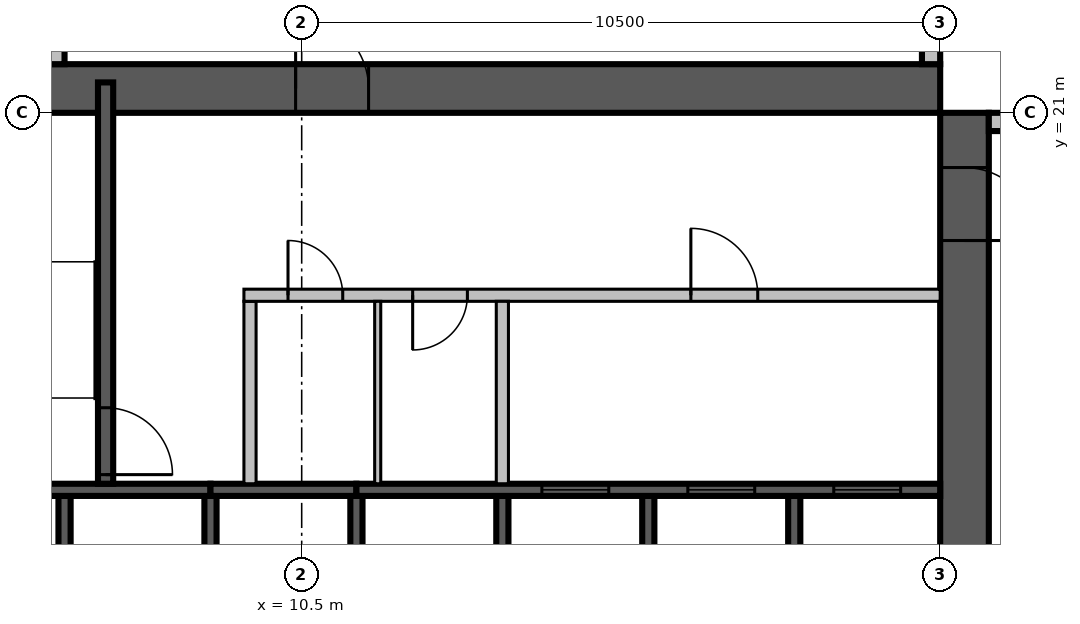
"""IFC4 building model, lengths in metres.
Left out: names, types, materials, properties, quantities, classifications, styles, units other than length and angle.
Written with IfcOpenShell. Run it as: python <this file> out.ifc"""

import sys

from ifc_helpers import new_model, si_unit, direction, frame, frame_2d, origin, place, context, subcontext, project, spatial, rectangle, extrude, source, transform, mapped, element, fill, save


model = new_model("IFC4")
c1 = context("Model", 3, precision=1e-05, world=origin(), true_north=direction((0.0, 1.0)))
c2 = subcontext(c1, "Body", "Model", "MODEL_VIEW")
j1 = project(units=[si_unit("LENGTHUNIT", "METRE"), si_unit("PLANEANGLEUNIT", "RADIAN")], contexts=[c1])
p1 = place(None, origin())
s1 = spatial("IfcSite", under=j1, at=p1, CompositionType="ELEMENT")
p2 = place(p1, origin())
s2 = spatial("IfcBuilding", under=s1, at=p2, CompositionType="ELEMENT")
p3 = place(p2, frame((0.0, 0.0, 204.4)))
s3 = spatial("IfcBuildingStorey", under=s2, at=p3, CompositionType="ELEMENT", Elevation=204.4)
m1 = source(origin(), c2, "Body", "SweptSolid", [
    extrude(rectangle(XDim=16.8, YDim=0.8, at=frame_2d((8.4, 0.0))), origin(), (0.0, 0.0, 1.0), 3.8),
])
p4 = place(p3, frame((21.4, 4.2, 0.0), z_axis=(0.0, 0.0, 1.0), x_axis=(0.0, 1.0, 0.0)))
e1 = element("IfcWall", 1, at=p4, inside=s3, PredefinedType="SHEAR", context=c2, shape_type="MappedRepresentation", body=[
    mapped(m1, transform((0.0, 0.0, 0.0), scale=1.0)),
])
m2 = source(origin(), c2, "Body", "SweptSolid", [
    extrude(rectangle(XDim=2.2, YDim=2.1, at=frame_2d((1.1, 1.05))), frame((0.0, 0.41, 0.0), z_axis=(0.0, -1.0, 0.0), x_axis=(1.0, 0.0, 0.0)), (0.0, 0.0, 1.0), 0.82),
])
p5 = place(p4, frame((4.2, 0.0, 0.0)))
e2 = element("IfcOpeningElement", 2, at=p5, cuts=e1, PredefinedType="OPENING", context=c2, shape_type="MappedRepresentation", body=[
    mapped(m2, transform((0.0, 0.0, 0.0), scale=1.0)),
])
m3 = source(origin(), c2, "Body", "SweptSolid", [
    extrude(rectangle(XDim=1.2, YDim=2.1, at=frame_2d((0.6, 1.05))), frame((0.0, 0.41, 0.0), z_axis=(0.0, -1.0, 0.0), x_axis=(1.0, 0.0, 0.0)), (0.0, 0.0, 1.0), 0.82),
])
p6 = place(p4, frame((14.7, 0.0, 0.0)))
e3 = element("IfcOpeningElement", 3, at=p6, cuts=e1, PredefinedType="OPENING", context=c2, shape_type="MappedRepresentation", body=[
    mapped(m3, transform((0.0, 0.0, 0.0), scale=1.0)),
])
p7 = place(p3, frame((4.2, 21.4, 0.0), z_axis=(0.0, 0.0, 1.0), x_axis=(1.0, 0.0, 0.0)))
e4 = element("IfcWall", 4, at=p7, inside=s3, PredefinedType="SHEAR", context=c2, shape_type="MappedRepresentation", body=[
    mapped(m1, transform((0.0, 0.0, 0.0), scale=1.0)),
])
p8 = place(p7, frame((6.2, 0.0, 0.0)))
e5 = element("IfcOpeningElement", 5, at=p8, cuts=e4, PredefinedType="OPENING", context=c2, shape_type="MappedRepresentation", body=[
    mapped(m3, transform((0.0, 0.0, 0.0), scale=1.0)),
])
m4 = source(origin(), c2, "Body", "SweptSolid", [
    extrude(rectangle(XDim=7.15, YDim=0.3, at=frame_2d((3.575, 0.0))), origin(), (0.0, 0.0, 1.0), 3.4),
])
p9 = place(p3, frame((28.95, 20.85, 0.0), z_axis=(0.0, 0.0, 1.0), x_axis=(-1.0, 0.0, 0.0)))
e6 = element("IfcWall", 6, at=p9, inside=s3, PredefinedType="STANDARD", context=c2, shape_type="MappedRepresentation", body=[
    mapped(m4, transform((0.0, 0.0, 0.0), scale=1.0)),
])
m5 = source(origin(), c2, "Body", "SweptSolid", [
    extrude(rectangle(XDim=3.0, YDim=2.3, at=frame_2d((1.5, 1.15))), frame((0.0, 0.16, 0.0), z_axis=(0.0, -1.0, 0.0), x_axis=(1.0, 0.0, 0.0)), (0.0, 0.0, 1.0), 0.32),
])
p10 = place(p9, frame((0.15, 0.0, 0.6)))
e7 = element("IfcOpeningElement", 7, at=p10, cuts=e6, PredefinedType="OPENING", context=c2, shape_type="MappedRepresentation", body=[
    mapped(m5, transform((0.0, 0.0, 0.0), scale=1.0)),
])
m6 = source(origin(), c2, "Body", "SweptSolid", [
    extrude(rectangle(XDim=1.8, YDim=2.3, at=frame_2d((0.9, 1.15))), frame((0.0, 0.16, 0.0), z_axis=(0.0, -1.0, 0.0), x_axis=(1.0, 0.0, 0.0)), (0.0, 0.0, 1.0), 0.32),
])
p11 = place(p9, frame((4.95, 0.0, 0.6)))
e8 = element("IfcOpeningElement", 8, at=p11, cuts=e6, PredefinedType="OPENING", context=c2, shape_type="MappedRepresentation", body=[
    mapped(m6, transform((0.0, 0.0, 0.0), scale=1.0)),
])
p12 = place(p3, frame((20.85, 21.8, 0.0), z_axis=(0.0, 0.0, 1.0), x_axis=(0.0, 1.0, 0.0)))
e9 = element("IfcWall", 9, at=p12, inside=s3, PredefinedType="STANDARD", context=c2, shape_type="MappedRepresentation", body=[
    mapped(m4, transform((0.0, 0.0, 0.0), scale=1.0)),
])
p13 = place(p12, frame((0.4, 0.0, 0.6)))
e10 = element("IfcOpeningElement", 10, at=p13, cuts=e9, PredefinedType="OPENING", context=c2, shape_type="MappedRepresentation", body=[
    mapped(m6, transform((0.0, 0.0, 0.0), scale=1.0)),
])
p14 = place(p12, frame((4.0, 0.0, 0.6)))
e11 = element("IfcOpeningElement", 11, at=p14, cuts=e9, PredefinedType="OPENING", context=c2, shape_type="MappedRepresentation", body=[
    mapped(m5, transform((0.0, 0.0, 0.0), scale=1.0)),
])
p15 = place(p3, frame((6.45, 38.4, 0.0), z_axis=(0.0, 0.0, 1.0), x_axis=(0.0, -1.0, 0.0)))
e12 = element("IfcWall", 12, at=p15, inside=s3, PredefinedType="STANDARD", context=c2, shape_type="SweptSolid", body=[
    extrude(rectangle(XDim=16.6, YDim=0.3, at=frame_2d((8.3, 0.0))), origin(), (0.0, 0.0, 1.0), 2.9),
])
p16 = place(p15, frame((1.15, 0.0, 0.6)))
e13 = element("IfcOpeningElement", 13, at=p16, cuts=e12, PredefinedType="OPENING", context=c2, shape_type="MappedRepresentation", body=[
    mapped(m6, transform((0.0, 0.0, 0.0), scale=1.0)),
])
p17 = place(p15, frame((5.162, 0.0, 0.6)))
e14 = element("IfcOpeningElement", 14, at=p17, cuts=e12, PredefinedType="OPENING", context=c2, shape_type="MappedRepresentation", body=[
    mapped(m6, transform((0.0, 0.0, 0.0), scale=1.0)),
])
p18 = place(p15, frame((9.438, 0.0, 0.6)))
e15 = element("IfcOpeningElement", 15, at=p18, cuts=e12, PredefinedType="OPENING", context=c2, shape_type="MappedRepresentation", body=[
    mapped(m6, transform((0.0, 0.0, 0.0), scale=1.0)),
])
m7 = source(origin(), c2, "Body", "SweptSolid", [
    extrude(rectangle(XDim=1.2, YDim=2.3, at=frame_2d((0.6, 1.15))), frame((0.0, 0.16, 0.0), z_axis=(0.0, -1.0, 0.0), x_axis=(1.0, 0.0, 0.0)), (0.0, 0.0, 1.0), 0.32),
])
p19 = place(p15, frame((14.338, 0.0, 0.6)))
e16 = element("IfcOpeningElement", 16, at=p19, cuts=e12, PredefinedType="OPENING", context=c2, shape_type="MappedRepresentation", body=[
    mapped(m7, transform((0.0, 0.0, 0.0), scale=1.0)),
])
p20 = place(p15, frame((11.887, 0.0, 0.6)))
e17 = element("IfcOpeningElement", 17, at=p20, cuts=e12, PredefinedType="OPENING", context=c2, shape_type="MappedRepresentation", body=[
    mapped(m6, transform((0.0, 0.0, 0.0), scale=1.0)),
])
m8 = source(origin(), c2, "Body", "SweptSolid", [
    extrude(rectangle(XDim=3.0, YDim=0.2, at=frame_2d((1.5, 0.0))), origin(), (0.0, 0.0, 1.0), 3.8),
])
p21 = place(p3, frame((6.6, 11.7, 0.0), z_axis=(0.0, 0.0, 1.0), x_axis=(0.0, 1.0, 0.0)))
e18 = element("IfcWall", 18, at=p21, inside=s3, PredefinedType="SOLIDWALL", context=c2, shape_type="MappedRepresentation", body=[
    mapped(m8, transform((0.0, 0.0, 0.0), scale=1.0)),
])
m9 = source(origin(), c2, "Body", "SweptSolid", [
    extrude(rectangle(XDim=3.0, YDim=0.2, at=frame_2d((1.5, 0.0))), origin(), (0.0, 0.0, 1.0), 3.4),
])
for number, where, z_axis, x_axis in (
    (19, (9.0, 11.7, 0.0), (0.0, 0.0, 1.0), (0.0, 1.0, 0.0)),
    (20, (11.4, 11.7, 0.0), (0.0, 0.0, 1.0), (0.0, 1.0, 0.0)),
):
    element("IfcWall", number, at=place(p3, frame(where, z_axis=z_axis, x_axis=x_axis)), inside=s3, PredefinedType="SOLIDWALL", context=c2, shape_type="MappedRepresentation", body=[
        mapped(m9, transform((0.0, 0.0, 0.0), scale=1.0)),
    ])
for number, where, z_axis, x_axis in (
    (21, (13.8, 11.7, 0.0), (0.0, 0.0, 1.0), (0.0, 1.0, 0.0)),
    (22, (16.2, 11.7, 0.0), (0.0, 0.0, 1.0), (0.0, 1.0, 0.0)),
    (23, (18.6, 11.7, 0.0), (0.0, 0.0, 1.0), (0.0, 1.0, 0.0)),
):
    element("IfcWall", number, at=place(p3, frame(where, z_axis=z_axis, x_axis=x_axis)), inside=s3, PredefinedType="SOLIDWALL", context=c2, shape_type="MappedRepresentation", body=[
        mapped(m8, transform((0.0, 0.0, 0.0), scale=1.0)),
    ])
m10 = source(origin(), c2, "Body", "SweptSolid", [
    extrude(rectangle(XDim=4.8, YDim=0.2, at=frame_2d((2.4, 0.0))), origin(), (0.0, 0.0, 1.0), 3.8),
])
p22 = place(p3, frame((4.2, 14.8, 0.0), z_axis=(0.0, 0.0, 1.0), x_axis=(1.0, 0.0, 0.0)))
e24 = element("IfcWall", 24, at=p22, inside=s3, PredefinedType="SOLIDWALL", context=c2, shape_type="MappedRepresentation", body=[
    mapped(m10, transform((0.0, 0.0, 0.0), scale=1.0)),
])
m11 = source(origin(), c2, "Body", "SweptSolid", [
    extrude(rectangle(XDim=2.4, YDim=0.2, at=frame_2d((1.2, 0.0))), origin(), (0.0, 0.0, 1.0), 3.4),
])
p23 = place(p3, frame((9.0, 14.8, 0.0), z_axis=(0.0, 0.0, 1.0), x_axis=(1.0, 0.0, 0.0)))
e25 = element("IfcWall", 25, at=p23, inside=s3, PredefinedType="SOLIDWALL", context=c2, shape_type="MappedRepresentation", body=[
    mapped(m11, transform((0.0, 0.0, 0.0), scale=1.0)),
])
m12 = source(origin(), c2, "Body", "SweptSolid", [
    extrude(rectangle(XDim=9.6, YDim=0.2, at=frame_2d((4.8, 0.0))), origin(), (0.0, 0.0, 1.0), 3.8),
])
p24 = place(p3, frame((11.4, 14.8, 0.0), z_axis=(0.0, 0.0, 1.0), x_axis=(1.0, 0.0, 0.0)))
e26 = element("IfcWall", 26, at=p24, inside=s3, PredefinedType="SOLIDWALL", context=c2, shape_type="MappedRepresentation", body=[
    mapped(m12, transform((0.0, 0.0, 0.0), scale=1.0)),
])
m13 = source(origin(), c2, "Body", "SweptSolid", [
    extrude(rectangle(XDim=1.1, YDim=2.1, at=frame_2d((0.55, 1.05))), frame((0.0, 0.11, 0.0), z_axis=(0.0, -1.0, 0.0), x_axis=(1.0, 0.0, 0.0)), (0.0, 0.0, 1.0), 0.22),
])
p25 = place(p24, frame((3.05, 0.0, 0.0)))
e27 = element("IfcOpeningElement", 27, at=p25, cuts=e26, PredefinedType="OPENING", context=c2, shape_type="MappedRepresentation", body=[
    mapped(m13, transform((0.0, 0.0, 0.0), scale=1.0)),
])
p26 = place(p24, frame((5.45, 0.0, 0.0)))
e28 = element("IfcOpeningElement", 28, at=p26, cuts=e26, PredefinedType="OPENING", context=c2, shape_type="MappedRepresentation", body=[
    mapped(m13, transform((0.0, 0.0, 0.0), scale=1.0)),
])
p27 = place(p24, frame((7.85, 0.0, 0.0)))
e29 = element("IfcOpeningElement", 29, at=p27, cuts=e26, PredefinedType="OPENING", context=c2, shape_type="MappedRepresentation", body=[
    mapped(m13, transform((0.0, 0.0, 0.0), scale=1.0)),
])
m14 = source(origin(), c2, "Body", "SweptSolid", [
    extrude(rectangle(XDim=6.6, YDim=0.25, at=frame_2d((3.3, 0.0))), origin(), (0.0, 0.0, 1.0), 3.4),
])
p28 = place(p3, frame((7.275, 14.9, 0.0), z_axis=(0.0, 0.0, 1.0), x_axis=(0.0, 1.0, 0.0)))
e30 = element("IfcWall", 30, at=p28, inside=s3, PredefinedType="SOLIDWALL", context=c2, shape_type="MappedRepresentation", body=[
    mapped(m14, transform((0.0, 0.0, 0.0), scale=1.0)),
])
m15 = source(origin(), c2, "Body", "SweptSolid", [
    extrude(rectangle(XDim=1.1, YDim=2.1, at=frame_2d((0.55, 1.05))), frame((0.0, 0.135, 0.0), z_axis=(0.0, -1.0, 0.0), x_axis=(1.0, 0.0, 0.0)), (0.0, 0.0, 1.0), 0.27),
])
p29 = place(p28, frame((0.15, 0.0, 0.0)))
e31 = element("IfcOpeningElement", 31, at=p29, cuts=e30, PredefinedType="OPENING", context=c2, shape_type="MappedRepresentation", body=[
    mapped(m15, transform((0.0, 0.0, 0.0), scale=1.0)),
])
m16 = source(origin(), c2, "Body", "SweptSolid", [
    extrude(rectangle(XDim=3.0, YDim=0.2, at=frame_2d((1.5, 0.0))), origin(), (0.0, 0.0, 1.0), 3.4),
])
p30 = place(p3, frame((9.65, 14.9, 0.0), z_axis=(0.0, 0.0, 1.0), x_axis=(0.0, 1.0, 0.0)))
e32 = element("IfcWall", 32, at=p30, inside=s3, PredefinedType="PARTITIONING", context=c2, shape_type="MappedRepresentation", body=[
    mapped(m16, transform((0.0, 0.0, 0.0), scale=1.0)),
])
m17 = source(origin(), c2, "Body", "SweptSolid", [
    extrude(rectangle(XDim=11.45, YDim=0.2, at=frame_2d((5.725, 0.0))), origin(), (0.0, 0.0, 1.0), 3.4),
])
p31 = place(p3, frame((9.55, 18.0, 0.0), z_axis=(0.0, 0.0, 1.0), x_axis=(1.0, 0.0, 0.0)))
e33 = element("IfcWall", 33, at=p31, inside=s3, PredefinedType="PARTITIONING", context=c2, shape_type="MappedRepresentation", body=[
    mapped(m17, transform((0.0, 0.0, 0.0), scale=1.0)),
])
m18 = source(origin(), c2, "Body", "SweptSolid", [
    extrude(rectangle(XDim=0.9, YDim=2.1, at=frame_2d((0.45, 1.05))), frame((0.0, 0.11, 0.0), z_axis=(0.0, -1.0, 0.0), x_axis=(1.0, 0.0, 0.0)), (0.0, 0.0, 1.0), 0.22),
])
p32 = place(p31, frame((0.725, 0.0, 0.0)))
e34 = element("IfcOpeningElement", 34, at=p32, cuts=e33, PredefinedType="OPENING", context=c2, shape_type="MappedRepresentation", body=[
    mapped(m18, transform((0.0, 0.0, 0.0), scale=1.0)),
])
p33 = place(p31, frame((2.775, 0.0, 0.0)))
e35 = element("IfcOpeningElement", 35, at=p33, cuts=e33, PredefinedType="OPENING", context=c2, shape_type="MappedRepresentation", body=[
    mapped(m18, transform((0.0, 0.0, 0.0), scale=1.0)),
])
p34 = place(p31, frame((7.35, 0.0, 0.0)))
e36 = element("IfcOpeningElement", 36, at=p34, cuts=e33, PredefinedType="OPENING", context=c2, shape_type="MappedRepresentation", body=[
    mapped(m13, transform((0.0, 0.0, 0.0), scale=1.0)),
])
p35 = place(p3, frame((13.8, 14.9, 0.0), z_axis=(0.0, 0.0, 1.0), x_axis=(0.0, 1.0, 0.0)))
e37 = element("IfcWall", 37, at=p35, inside=s3, PredefinedType="PARTITIONING", context=c2, shape_type="MappedRepresentation", body=[
    mapped(m16, transform((0.0, 0.0, 0.0), scale=1.0)),
])
m19 = source(origin(), c2, "Body", "SweptSolid", [
    extrude(rectangle(XDim=3.0, YDim=0.1, at=frame_2d((1.5, 0.0))), origin(), (0.0, 0.0, 1.0), 3.4),
])
p36 = place(p3, frame((11.75, 14.9, 0.0), z_axis=(0.0, 0.0, 1.0), x_axis=(0.0, 1.0, 0.0)))
e38 = element("IfcWall", 38, at=p36, inside=s3, PredefinedType="PARTITIONING", context=c2, shape_type="MappedRepresentation", body=[
    mapped(m19, transform((0.0, 0.0, 0.0), scale=1.0)),
])
m20 = source(origin(), c2, "Body", "SweptSolid", [
    extrude(rectangle(XDim=1.1, YDim=2.1, at=frame_2d((0.55, 1.05))), frame((0.0, 0.025, 0.0), z_axis=(0.0, -1.0, 0.0), x_axis=(1.0, 0.0, 0.0)), (0.0, 0.0, 1.0), 0.05),
])
p37 = place(p25, origin())
e39 = element("IfcDoor", 39, at=p37, inside=s3, OperationType="SLIDING_TO_LEFT", PredefinedType="DOOR", context=c2, shape_type="MappedRepresentation", body=[
    mapped(m20, transform((0.0, 0.0, 0.0), scale=1.0)),
])
fill(e27, e39)
p38 = place(p26, origin())
e40 = element("IfcDoor", 40, at=p38, inside=s3, OperationType="SLIDING_TO_LEFT", PredefinedType="DOOR", context=c2, shape_type="MappedRepresentation", body=[
    mapped(m20, transform((0.0, 0.0, 0.0), scale=1.0)),
])
fill(e28, e40)
p39 = place(p27, origin())
e41 = element("IfcDoor", 41, at=p39, inside=s3, OperationType="SLIDING_TO_LEFT", PredefinedType="DOOR", context=c2, shape_type="MappedRepresentation", body=[
    mapped(m20, transform((0.0, 0.0, 0.0), scale=1.0)),
])
fill(e29, e41)
p40 = place(p29, origin())
e42 = element("IfcDoor", 42, at=p40, inside=s3, OperationType="SINGLE_SWING_RIGHT", PredefinedType="DOOR", context=c2, shape_type="MappedRepresentation", body=[
    mapped(m20, transform((0.0, 0.0, 0.0), scale=1.0)),
])
fill(e31, e42)
m21 = source(origin(), c2, "Body", "SweptSolid", [
    extrude(rectangle(XDim=0.9, YDim=2.1, at=frame_2d((0.45, 1.05))), frame((0.0, 0.025, 0.0), z_axis=(0.0, -1.0, 0.0), x_axis=(1.0, 0.0, 0.0)), (0.0, 0.0, 1.0), 0.05),
])
p41 = place(p32, origin())
e43 = element("IfcDoor", 43, at=p41, inside=s3, OperationType="SINGLE_SWING_LEFT", PredefinedType="DOOR", context=c2, shape_type="MappedRepresentation", body=[
    mapped(m21, transform((0.0, 0.0, 0.0), scale=1.0)),
])
fill(e34, e43)
p42 = place(p33, origin())
e44 = element("IfcDoor", 44, at=p42, inside=s3, OperationType="SINGLE_SWING_RIGHT", PredefinedType="DOOR", context=c2, shape_type="MappedRepresentation", body=[
    mapped(m21, transform((0.0, 0.0, 0.0), scale=1.0)),
])
fill(e35, e44)
p43 = place(p34, origin())
e45 = element("IfcDoor", 45, at=p43, inside=s3, OperationType="SINGLE_SWING_LEFT", PredefinedType="DOOR", context=c2, shape_type="MappedRepresentation", body=[
    mapped(m20, transform((0.0, 0.0, 0.0), scale=1.0)),
])
fill(e36, e45)
m22 = source(origin(), c2, "Body", "SweptSolid", [
    extrude(rectangle(XDim=1.2, YDim=2.1, at=frame_2d((0.6, 1.05))), frame((0.0, 0.025, 0.0), z_axis=(0.0, -1.0, 0.0), x_axis=(1.0, 0.0, 0.0)), (0.0, 0.0, 1.0), 0.05),
])
p44 = place(p8, origin())
e46 = element("IfcDoor", 46, at=p44, inside=s3, OperationType="SINGLE_SWING_LEFT", PredefinedType="DOOR", context=c2, shape_type="MappedRepresentation", body=[
    mapped(m22, transform((0.0, 0.0, 0.0), scale=1.0)),
])
fill(e5, e46)
p45 = place(p6, origin())
e47 = element("IfcDoor", 47, at=p45, inside=s3, OperationType="SINGLE_SWING_RIGHT", PredefinedType="DOOR", context=c2, shape_type="MappedRepresentation", body=[
    mapped(m22, transform((0.0, 0.0, 0.0), scale=1.0)),
])
fill(e3, e47)
save(model, sys.argv[1])
